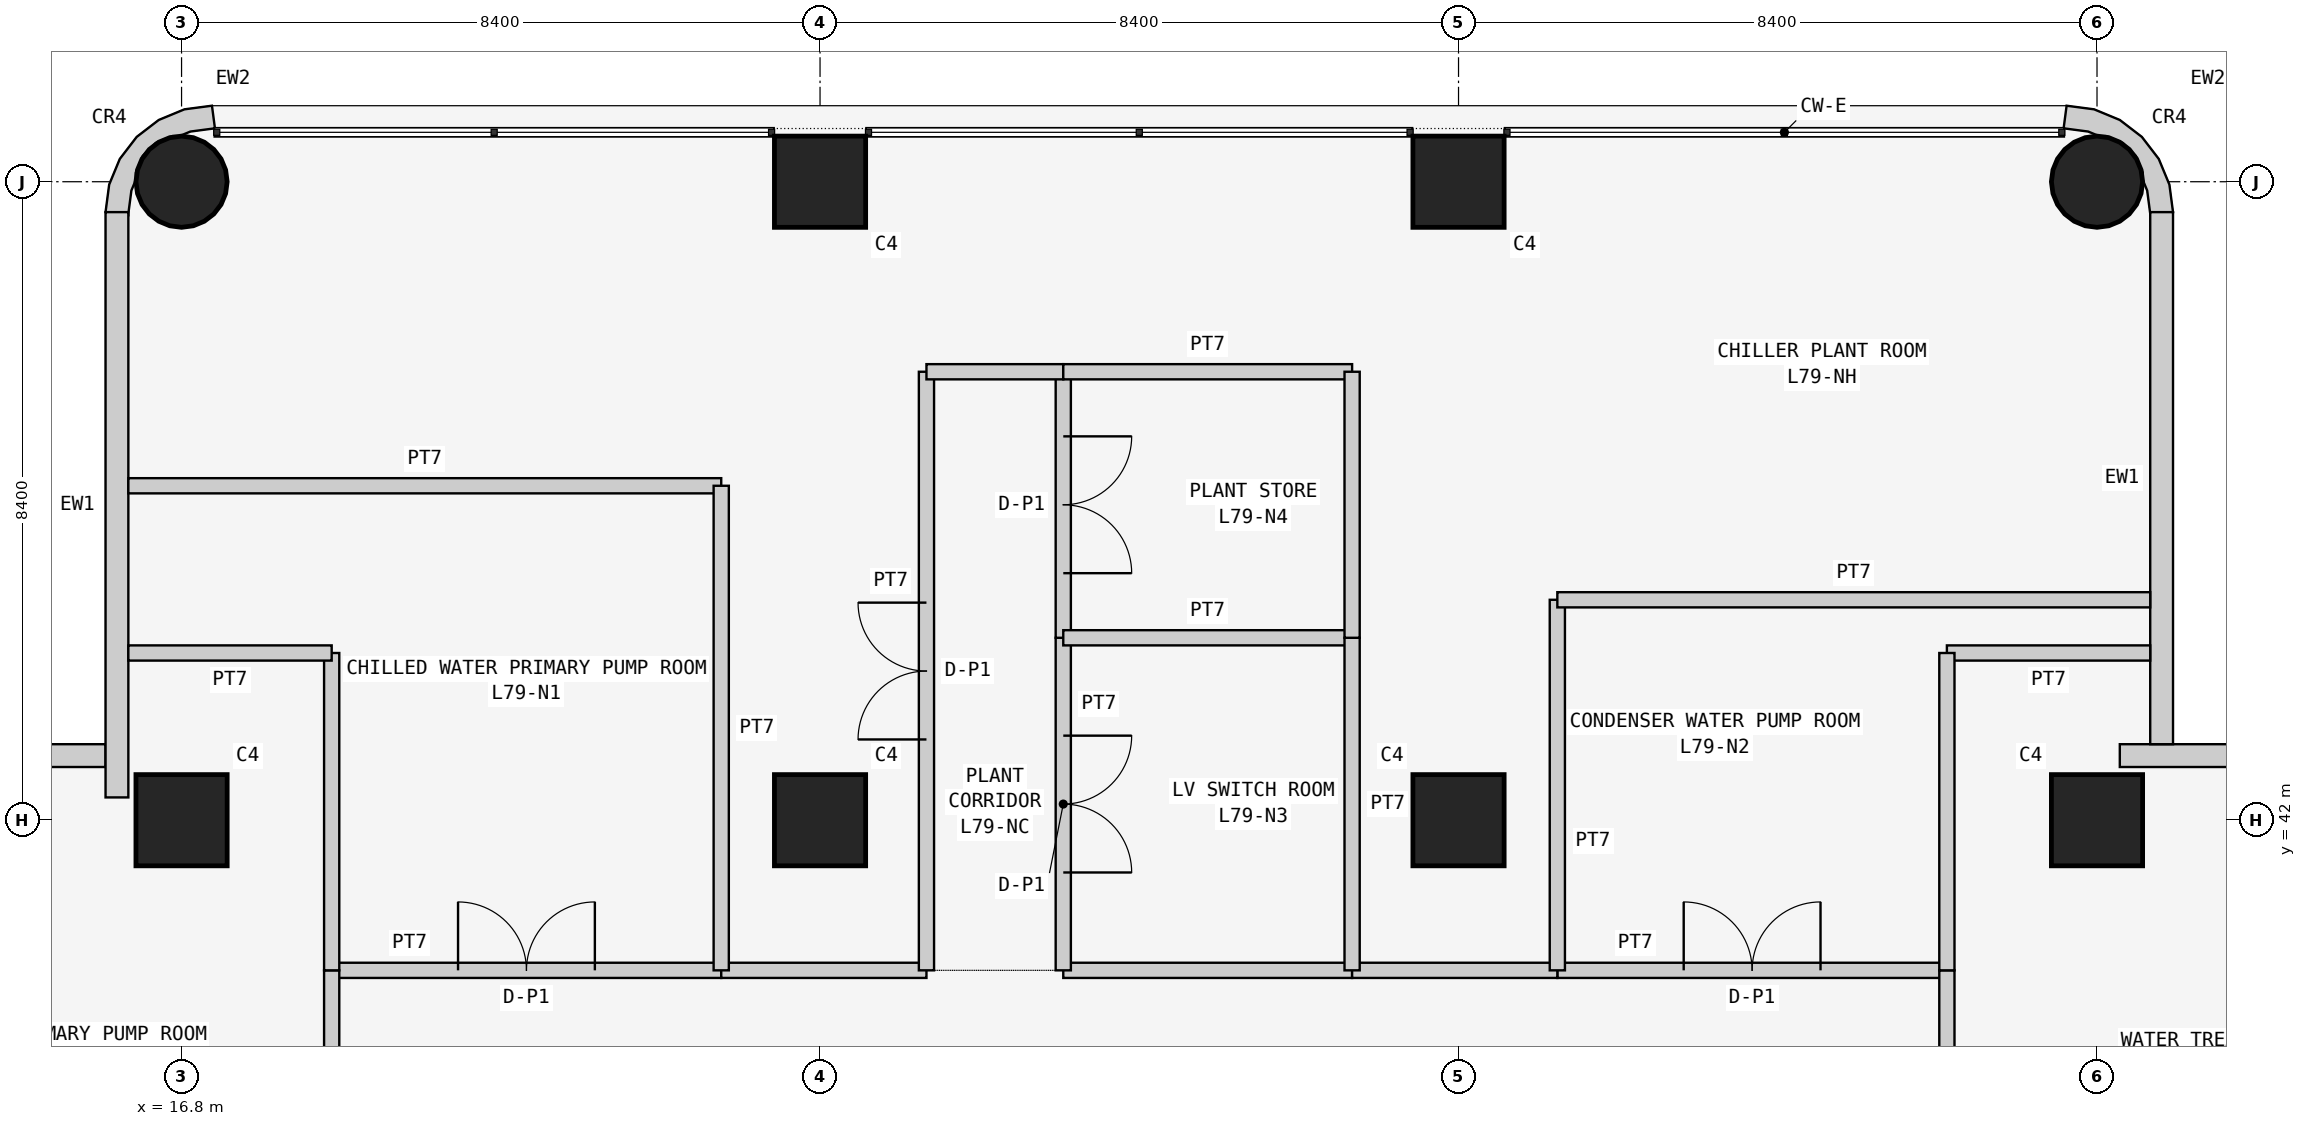
"""IFC4 building model, lengths in metres.
Left out: names, types, materials, properties, quantities, classifications, styles, units other than length and angle.
Written with IfcOpenShell. Run it as: python <this file> out.ifc"""

import sys

from ifc_helpers import new_model, si_unit, direction, frame, frame_2d, origin, origin_2d, place, context, subcontext, project, spatial, polyline, rectangle, circle, outline, extrude, element, fill, save


model = new_model("IFC4")
c1 = context("Model", 3, precision=1e-05, world=origin(), true_north=direction((0.0, 1.0)))
c2 = subcontext(c1, "Body", "Model", "MODEL_VIEW")
j1 = project(units=[si_unit("LENGTHUNIT", "METRE"), si_unit("PLANEANGLEUNIT", "RADIAN")], contexts=[c1])
p1 = place(None, origin())
s1 = spatial("IfcSite", under=j1, at=p1, CompositionType="ELEMENT")
p2 = place(p1, origin())
s2 = spatial("IfcBuilding", under=s1, at=p2, CompositionType="ELEMENT")
p3 = place(p2, frame((0.0, 0.0, 300.9)))
s3 = spatial("IfcBuildingStorey", under=s2, at=p3, CompositionType="ELEMENT", Elevation=300.9)
p4 = place(p3, frame((16.8, 42.0, 0.0), z_axis=(0.0, 0.0, 1.0), x_axis=(1.0, 0.0, 0.0)))
e1 = element("IfcColumn", 1, at=p4, inside=s3, PredefinedType="COLUMN", context=c2, shape_type="SweptSolid", body=[
    extrude(rectangle(XDim=1.2, YDim=1.2, at=origin_2d()), origin(), (0.0, 0.0, 1.0), 4.5),
])
p5 = place(p3, frame((16.8, 50.4, 0.0), z_axis=(0.0, 0.0, 1.0), x_axis=(1.0, 0.0, 0.0)))
e2 = element("IfcColumn", 2, at=p5, inside=s3, PredefinedType="COLUMN", context=c2, shape_type="SweptSolid", body=[
    extrude(circle(Radius=0.6, at=origin_2d()), origin(), (0.0, 0.0, 1.0), 4.5),
])
for number, where, z_axis, x_axis in (
    (3, (25.2, 42.0, 0.0), (0.0, 0.0, 1.0), (1.0, 0.0, 0.0)),
    (4, (25.2, 50.4, 0.0), (0.0, 0.0, 1.0), (1.0, 0.0, 0.0)),
    (5, (33.6, 42.0, 0.0), (0.0, 0.0, 1.0), (1.0, 0.0, 0.0)),
    (6, (33.6, 50.4, 0.0), (0.0, 0.0, 1.0), (1.0, 0.0, 0.0)),
    (7, (42.0, 42.0, 0.0), (0.0, 0.0, 1.0), (1.0, 0.0, 0.0)),
):
    element("IfcColumn", number, at=place(p3, frame(where, z_axis=z_axis, x_axis=x_axis)), inside=s3, PredefinedType="COLUMN", context=c2, shape_type="SweptSolid", body=[
        extrude(rectangle(XDim=1.2, YDim=1.2, at=origin_2d()), origin(), (0.0, 0.0, 1.0), 4.5),
    ])
p6 = place(p3, frame((42.0, 50.4, 0.0), z_axis=(0.0, 0.0, 1.0), x_axis=(1.0, 0.0, 0.0)))
e8 = element("IfcColumn", 8, at=p6, inside=s3, PredefinedType="COLUMN", context=c2, shape_type="SweptSolid", body=[
    extrude(circle(Radius=0.6, at=origin_2d()), origin(), (0.0, 0.0, 1.0), 4.5),
])
p7 = place(p3, frame((15.8, 42.85, 0.0), z_axis=(0.0, 0.0, 1.0), x_axis=(-1.0, 0.0, 0.0)))
e9 = element("IfcWall", 9, at=p7, inside=s3, PredefinedType="SOLIDWALL", context=c2, shape_type="SweptSolid", body=[
    extrude(rectangle(XDim=7.0, YDim=0.3, at=frame_2d((3.5, 0.0))), origin(), (0.0, 0.0, 1.0), 4.25),
])
p8 = place(p3, frame((50.0, 42.85, 0.0), z_axis=(0.0, 0.0, 1.0), x_axis=(-1.0, 0.0, 0.0)))
e10 = element("IfcWall", 10, at=p8, inside=s3, PredefinedType="SOLIDWALL", context=c2, shape_type="SweptSolid", body=[
    extrude(rectangle(XDim=7.7, YDim=0.3, at=frame_2d((3.85, 0.0))), origin(), (0.0, 0.0, 1.0), 4.25),
])
p9 = place(p3, frame((42.85, 43.0, 0.0), z_axis=(0.0, 0.0, 1.0), x_axis=(0.0, 1.0, 0.0)))
e11 = element("IfcWall", 11, at=p9, inside=s3, PredefinedType="SOLIDWALL", context=c2, shape_type="SweptSolid", body=[
    extrude(rectangle(XDim=7.0, YDim=0.3, at=frame_2d((3.5, 0.0))), origin(), (0.0, 0.0, 1.0), 4.25),
])
p10 = place(p3, frame((15.95, 50.0, 0.0), z_axis=(0.0, 0.0, 1.0), x_axis=(0.0, -1.0, 0.0)))
e12 = element("IfcWall", 12, at=p10, inside=s3, PredefinedType="SOLIDWALL", context=c2, shape_type="SweptSolid", body=[
    extrude(rectangle(XDim=7.7, YDim=0.3, at=frame_2d((3.85, 0.0))), origin(), (0.0, 0.0, 1.0), 4.25),
])
p11 = place(p3, frame((42.576, 50.038, 0.0), z_axis=(0.0, 0.0, 1.0), x_axis=(0.707106781187, 0.707106781187, 0.0)))
e13 = element("IfcWall", 13, at=p11, inside=s3, PredefinedType="SOLIDWALL", context=c2, shape_type="SweptSolid", body=[
    extrude(outline(polyline([(0.233, 0.114), (0.047, -0.129), (0.033, -0.143), (0.273, -0.327), (0.495, -0.037), (0.635, 0.3), (0.683, 0.663), (0.635, 1.025), (0.495, 1.363), (0.273, 1.653), (0.033, 1.469), (0.047, 1.455), (0.233, 1.212), (0.292, 1.069), (0.358, 1.003), (0.449, 0.782), (0.449, 0.543), (0.358, 0.322), (0.292, 0.257), (0.233, 0.114)])), origin(), (0.0, 0.0, 1.0), 4.25),
])
p12 = place(p3, frame((17.162, 50.976, 0.0), z_axis=(0.0, 0.0, 1.0), x_axis=(-0.707106781187, 0.707106781187, 0.0)))
e14 = element("IfcWall", 14, at=p12, inside=s3, PredefinedType="SOLIDWALL", context=c2, shape_type="SweptSolid", body=[
    extrude(outline(polyline([(0.047, -0.129), (0.033, -0.143), (0.273, -0.327), (0.495, -0.037), (0.635, 0.301), (0.683, 0.663), (0.635, 1.025), (0.495, 1.363), (0.273, 1.653), (0.033, 1.469), (0.047, 1.455), (0.233, 1.212), (0.292, 1.069), (0.358, 1.003), (0.449, 0.782), (0.449, 0.543), (0.358, 0.322), (0.292, 0.257), (0.233, 0.114), (0.047, -0.129)])), origin(), (0.0, 0.0, 1.0), 4.25),
])
p13 = place(p3, frame((18.775, 40.025, 0.0), z_axis=(0.0, 0.0, 1.0), x_axis=(1.0, 0.0, 0.0)))
e15 = element("IfcWall", 15, at=p13, inside=s3, PredefinedType="PARTITIONING", context=c2, shape_type="SweptSolid", body=[
    extrude(rectangle(XDim=5.125, YDim=0.2, at=frame_2d((2.562, 0.0))), origin(), (0.0, 0.0, 1.0), 4.25),
])
p14 = place(p13, frame((1.663, 0.0, 0.0)))
e16 = element("IfcOpeningElement", 16, at=p14, cuts=e15, PredefinedType="OPENING", context=c2, shape_type="SweptSolid", body=[
    extrude(rectangle(XDim=1.8, YDim=2.4, at=frame_2d((0.9, 1.2))), frame((0.0, 0.11, 0.0), z_axis=(0.0, -1.0, 0.0), x_axis=(1.0, 0.0, 0.0)), (0.0, 0.0, 1.0), 0.22),
])
p15 = place(p3, frame((34.9, 40.025, 0.0), z_axis=(0.0, 0.0, 1.0), x_axis=(1.0, 0.0, 0.0)))
e17 = element("IfcWall", 17, at=p15, inside=s3, PredefinedType="PARTITIONING", context=c2, shape_type="SweptSolid", body=[
    extrude(rectangle(XDim=5.125, YDim=0.2, at=frame_2d((2.562, 0.0))), origin(), (0.0, 0.0, 1.0), 4.25),
])
p16 = place(p15, frame((1.663, 0.0, 0.0)))
e18 = element("IfcOpeningElement", 18, at=p16, cuts=e17, PredefinedType="OPENING", context=c2, shape_type="SweptSolid", body=[
    extrude(rectangle(XDim=1.8, YDim=2.4, at=frame_2d((0.9, 1.2))), frame((0.0, 0.11, 0.0), z_axis=(0.0, -1.0, 0.0), x_axis=(1.0, 0.0, 0.0)), (0.0, 0.0, 1.0), 0.22),
])
p17 = place(p3, frame((28.4, 40.025, 0.0), z_axis=(0.0, 0.0, 1.0), x_axis=(1.0, 0.0, 0.0)))
e19 = element("IfcWall", 19, at=p17, inside=s3, PredefinedType="PARTITIONING", context=c2, shape_type="SweptSolid", body=[
    extrude(rectangle(XDim=3.8, YDim=0.2, at=frame_2d((1.9, 0.0))), origin(), (0.0, 0.0, 1.0), 4.25),
])
p18 = place(p3, frame((23.9, 40.025, 0.0), z_axis=(0.0, 0.0, 1.0), x_axis=(1.0, 0.0, 0.0)))
e20 = element("IfcWall", 20, at=p18, inside=s3, PredefinedType="PARTITIONING", context=c2, shape_type="SweptSolid", body=[
    extrude(rectangle(XDim=2.7, YDim=0.2, at=frame_2d((1.35, 0.0))), origin(), (0.0, 0.0, 1.0), 4.25),
])
p19 = place(p3, frame((32.2, 40.025, 0.0), z_axis=(0.0, 0.0, 1.0), x_axis=(1.0, 0.0, 0.0)))
e21 = element("IfcWall", 21, at=p19, inside=s3, PredefinedType="PARTITIONING", context=c2, shape_type="SweptSolid", body=[
    extrude(rectangle(XDim=2.7, YDim=0.2, at=frame_2d((1.35, 0.0))), origin(), (0.0, 0.0, 1.0), 4.25),
])
p20 = place(p3, frame((40.025, 40.025, 0.0), z_axis=(0.0, 0.0, 1.0), x_axis=(0.0, -1.0, 0.0)))
e22 = element("IfcWall", 22, at=p20, inside=s3, PredefinedType="PARTITIONING", context=c2, shape_type="SweptSolid", body=[
    extrude(rectangle(XDim=5.125, YDim=0.2, at=frame_2d((2.562, 0.0))), origin(), (0.0, 0.0, 1.0), 4.25),
])
p21 = place(p20, frame((1.663, 0.0, 0.0)))
e23 = element("IfcOpeningElement", 23, at=p21, cuts=e22, PredefinedType="OPENING", context=c2, shape_type="SweptSolid", body=[
    extrude(rectangle(XDim=1.8, YDim=2.4, at=frame_2d((0.9, 1.2))), frame((0.0, 0.11, 0.0), z_axis=(0.0, -1.0, 0.0), x_axis=(1.0, 0.0, 0.0)), (0.0, 0.0, 1.0), 0.22),
])
p22 = place(p3, frame((18.775, 34.9, 0.0), z_axis=(0.0, 0.0, 1.0), x_axis=(0.0, 1.0, 0.0)))
e24 = element("IfcWall", 24, at=p22, inside=s3, PredefinedType="PARTITIONING", context=c2, shape_type="SweptSolid", body=[
    extrude(rectangle(XDim=5.125, YDim=0.2, at=frame_2d((2.562, 0.0))), origin(), (0.0, 0.0, 1.0), 4.25),
])
p23 = place(p22, frame((1.663, 0.0, 0.0)))
e25 = element("IfcOpeningElement", 25, at=p23, cuts=e24, PredefinedType="OPENING", context=c2, shape_type="SweptSolid", body=[
    extrude(rectangle(XDim=1.8, YDim=2.4, at=frame_2d((0.9, 1.2))), frame((0.0, 0.11, 0.0), z_axis=(0.0, -1.0, 0.0), x_axis=(1.0, 0.0, 0.0)), (0.0, 0.0, 1.0), 0.22),
])
p24 = place(p3, frame((16.1, 46.4, 0.0), z_axis=(0.0, 0.0, 1.0), x_axis=(1.0, 0.0, 0.0)))
e26 = element("IfcWall", 26, at=p24, inside=s3, PredefinedType="PARTITIONING", context=c2, shape_type="SweptSolid", body=[
    extrude(rectangle(XDim=7.8, YDim=0.2, at=frame_2d((3.9, 0.0))), origin(), (0.0, 0.0, 1.0), 4.25),
])
p25 = place(p3, frame((23.9, 46.4, 0.0), z_axis=(0.0, 0.0, 1.0), x_axis=(0.0, -1.0, 0.0)))
e27 = element("IfcWall", 27, at=p25, inside=s3, PredefinedType="PARTITIONING", context=c2, shape_type="SweptSolid", body=[
    extrude(rectangle(XDim=6.375, YDim=0.2, at=frame_2d((3.188, 0.0))), origin(), (0.0, 0.0, 1.0), 4.25),
])
p26 = place(p3, frame((18.775, 40.025, 0.0), z_axis=(0.0, 0.0, 1.0), x_axis=(0.0, 1.0, 0.0)))
e28 = element("IfcWall", 28, at=p26, inside=s3, PredefinedType="PARTITIONING", context=c2, shape_type="SweptSolid", body=[
    extrude(rectangle(XDim=4.175, YDim=0.2, at=frame_2d((2.087, 0.0))), origin(), (0.0, 0.0, 1.0), 4.25),
])
p27 = place(p3, frame((18.775, 44.2, 0.0), z_axis=(0.0, 0.0, 1.0), x_axis=(-1.0, 0.0, 0.0)))
e29 = element("IfcWall", 29, at=p27, inside=s3, PredefinedType="PARTITIONING", context=c2, shape_type="SweptSolid", body=[
    extrude(rectangle(XDim=2.675, YDim=0.2, at=frame_2d((1.337, 0.0))), origin(), (0.0, 0.0, 1.0), 4.25),
])
p28 = place(p3, frame((34.9, 40.025, 0.0), z_axis=(0.0, 0.0, 1.0), x_axis=(0.0, 1.0, 0.0)))
e30 = element("IfcWall", 30, at=p28, inside=s3, PredefinedType="PARTITIONING", context=c2, shape_type="SweptSolid", body=[
    extrude(rectangle(XDim=4.875, YDim=0.2, at=frame_2d((2.438, 0.0))), origin(), (0.0, 0.0, 1.0), 4.25),
])
p29 = place(p3, frame((34.9, 44.9, 0.0), z_axis=(0.0, 0.0, 1.0), x_axis=(1.0, 0.0, 0.0)))
e31 = element("IfcWall", 31, at=p29, inside=s3, PredefinedType="PARTITIONING", context=c2, shape_type="SweptSolid", body=[
    extrude(rectangle(XDim=7.8, YDim=0.2, at=frame_2d((3.9, 0.0))), origin(), (0.0, 0.0, 1.0), 4.25),
])
p30 = place(p3, frame((42.7, 44.2, 0.0), z_axis=(0.0, 0.0, 1.0), x_axis=(-1.0, 0.0, 0.0)))
e32 = element("IfcWall", 32, at=p30, inside=s3, PredefinedType="PARTITIONING", context=c2, shape_type="SweptSolid", body=[
    extrude(rectangle(XDim=2.675, YDim=0.2, at=frame_2d((1.337, 0.0))), origin(), (0.0, 0.0, 1.0), 4.25),
])
p31 = place(p3, frame((40.025, 44.2, 0.0), z_axis=(0.0, 0.0, 1.0), x_axis=(0.0, -1.0, 0.0)))
e33 = element("IfcWall", 33, at=p31, inside=s3, PredefinedType="PARTITIONING", context=c2, shape_type="SweptSolid", body=[
    extrude(rectangle(XDim=4.175, YDim=0.2, at=frame_2d((2.087, 0.0))), origin(), (0.0, 0.0, 1.0), 4.25),
])
p32 = place(p3, frame((28.4, 44.4, 0.0), z_axis=(0.0, 0.0, 1.0), x_axis=(0.0, -1.0, 0.0)))
e34 = element("IfcWall", 34, at=p32, inside=s3, PredefinedType="PARTITIONING", context=c2, shape_type="SweptSolid", body=[
    extrude(rectangle(XDim=4.375, YDim=0.2, at=frame_2d((2.188, 0.0))), origin(), (0.0, 0.0, 1.0), 4.25),
])
p33 = place(p32, frame((1.288, 0.0, 0.0)))
e35 = element("IfcOpeningElement", 35, at=p33, cuts=e34, PredefinedType="OPENING", context=c2, shape_type="SweptSolid", body=[
    extrude(rectangle(XDim=1.8, YDim=2.4, at=frame_2d((0.9, 1.2))), frame((0.0, 0.11, 0.0), z_axis=(0.0, -1.0, 0.0), x_axis=(1.0, 0.0, 0.0)), (0.0, 0.0, 1.0), 0.22),
])
p34 = place(p3, frame((28.4, 47.9, 0.0), z_axis=(0.0, 0.0, 1.0), x_axis=(0.0, -1.0, 0.0)))
e36 = element("IfcWall", 36, at=p34, inside=s3, PredefinedType="PARTITIONING", context=c2, shape_type="SweptSolid", body=[
    extrude(rectangle(XDim=3.5, YDim=0.2, at=frame_2d((1.75, 0.0))), origin(), (0.0, 0.0, 1.0), 4.25),
])
p35 = place(p34, frame((0.85, 0.0, 0.0)))
e37 = element("IfcOpeningElement", 37, at=p35, cuts=e36, PredefinedType="OPENING", context=c2, shape_type="SweptSolid", body=[
    extrude(rectangle(XDim=1.8, YDim=2.4, at=frame_2d((0.9, 1.2))), frame((0.0, 0.11, 0.0), z_axis=(0.0, -1.0, 0.0), x_axis=(1.0, 0.0, 0.0)), (0.0, 0.0, 1.0), 0.22),
])
p36 = place(p3, frame((26.6, 40.025, 0.0), z_axis=(0.0, 0.0, 1.0), x_axis=(0.0, 1.0, 0.0)))
e38 = element("IfcWall", 38, at=p36, inside=s3, PredefinedType="PARTITIONING", context=c2, shape_type="SweptSolid", body=[
    extrude(rectangle(XDim=7.875, YDim=0.2, at=frame_2d((3.938, 0.0))), origin(), (0.0, 0.0, 1.0), 4.25),
])
p37 = place(p36, frame((3.038, 0.0, 0.0)))
e39 = element("IfcOpeningElement", 39, at=p37, cuts=e38, PredefinedType="OPENING", context=c2, shape_type="SweptSolid", body=[
    extrude(rectangle(XDim=1.8, YDim=2.4, at=frame_2d((0.9, 1.2))), frame((0.0, 0.11, 0.0), z_axis=(0.0, -1.0, 0.0), x_axis=(1.0, 0.0, 0.0)), (0.0, 0.0, 1.0), 0.22),
])
p38 = place(p3, frame((26.6, 47.9, 0.0), z_axis=(0.0, 0.0, 1.0), x_axis=(1.0, 0.0, 0.0)))
e40 = element("IfcWall", 40, at=p38, inside=s3, PredefinedType="PARTITIONING", context=c2, shape_type="SweptSolid", body=[
    extrude(rectangle(XDim=1.8, YDim=0.2, at=frame_2d((0.9, 0.0))), origin(), (0.0, 0.0, 1.0), 4.25),
])
p39 = place(p3, frame((28.4, 44.4, 0.0), z_axis=(0.0, 0.0, 1.0), x_axis=(1.0, 0.0, 0.0)))
e41 = element("IfcWall", 41, at=p39, inside=s3, PredefinedType="PARTITIONING", context=c2, shape_type="SweptSolid", body=[
    extrude(rectangle(XDim=3.8, YDim=0.2, at=frame_2d((1.9, 0.0))), origin(), (0.0, 0.0, 1.0), 4.25),
])
p40 = place(p3, frame((32.2, 44.4, 0.0), z_axis=(0.0, 0.0, 1.0), x_axis=(0.0, -1.0, 0.0)))
e42 = element("IfcWall", 42, at=p40, inside=s3, PredefinedType="PARTITIONING", context=c2, shape_type="SweptSolid", body=[
    extrude(rectangle(XDim=4.375, YDim=0.2, at=frame_2d((2.188, 0.0))), origin(), (0.0, 0.0, 1.0), 4.25),
])
p41 = place(p3, frame((28.4, 47.9, 0.0), z_axis=(0.0, 0.0, 1.0), x_axis=(1.0, 0.0, 0.0)))
e43 = element("IfcWall", 43, at=p41, inside=s3, PredefinedType="PARTITIONING", context=c2, shape_type="SweptSolid", body=[
    extrude(rectangle(XDim=3.8, YDim=0.2, at=frame_2d((1.9, 0.0))), origin(), (0.0, 0.0, 1.0), 4.25),
])
p42 = place(p3, frame((32.2, 47.9, 0.0), z_axis=(0.0, 0.0, 1.0), x_axis=(0.0, -1.0, 0.0)))
e44 = element("IfcWall", 44, at=p42, inside=s3, PredefinedType="PARTITIONING", context=c2, shape_type="SweptSolid", body=[
    extrude(rectangle(XDim=3.5, YDim=0.2, at=frame_2d((1.75, 0.0))), origin(), (0.0, 0.0, 1.0), 4.25),
])
p43 = place(p14, origin())
e45 = element("IfcDoor", 45, at=p43, inside=s3, OperationType="DOUBLE_DOOR_SINGLE_SWING", PredefinedType="DOOR", context=c2, shape_type="SweptSolid", body=[
    extrude(rectangle(XDim=1.8, YDim=2.4, at=frame_2d((0.9, 1.2))), frame((0.0, 0.025, 0.0), z_axis=(0.0, -1.0, 0.0), x_axis=(1.0, 0.0, 0.0)), (0.0, 0.0, 1.0), 0.05),
])
fill(e16, e45)
p44 = place(p16, origin())
e46 = element("IfcDoor", 46, at=p44, inside=s3, OperationType="DOUBLE_DOOR_SINGLE_SWING", PredefinedType="DOOR", context=c2, shape_type="SweptSolid", body=[
    extrude(rectangle(XDim=1.8, YDim=2.4, at=frame_2d((0.9, 1.2))), frame((0.0, 0.025, 0.0), z_axis=(0.0, -1.0, 0.0), x_axis=(1.0, 0.0, 0.0)), (0.0, 0.0, 1.0), 0.05),
])
fill(e18, e46)
p45 = place(p33, origin())
e47 = element("IfcDoor", 47, at=p45, inside=s3, OperationType="DOUBLE_DOOR_SINGLE_SWING", PredefinedType="DOOR", context=c2, shape_type="SweptSolid", body=[
    extrude(rectangle(XDim=1.8, YDim=2.4, at=frame_2d((0.9, 1.2))), frame((0.0, 0.025, 0.0), z_axis=(0.0, -1.0, 0.0), x_axis=(1.0, 0.0, 0.0)), (0.0, 0.0, 1.0), 0.05),
])
fill(e35, e47)
p46 = place(p35, origin())
e48 = element("IfcDoor", 48, at=p46, inside=s3, OperationType="DOUBLE_DOOR_SINGLE_SWING", PredefinedType="DOOR", context=c2, shape_type="SweptSolid", body=[
    extrude(rectangle(XDim=1.8, YDim=2.4, at=frame_2d((0.9, 1.2))), frame((0.0, 0.025, 0.0), z_axis=(0.0, -1.0, 0.0), x_axis=(1.0, 0.0, 0.0)), (0.0, 0.0, 1.0), 0.05),
])
fill(e37, e48)
p47 = place(p37, origin())
e49 = element("IfcDoor", 49, at=p47, inside=s3, OperationType="DOUBLE_DOOR_SINGLE_SWING", PredefinedType="DOOR", context=c2, shape_type="SweptSolid", body=[
    extrude(rectangle(XDim=1.8, YDim=2.4, at=frame_2d((0.9, 1.2))), frame((0.0, 0.025, 0.0), z_axis=(0.0, -1.0, 0.0), x_axis=(1.0, 0.0, 0.0)), (0.0, 0.0, 1.0), 0.05),
])
fill(e39, e49)
save(model, sys.argv[1])
